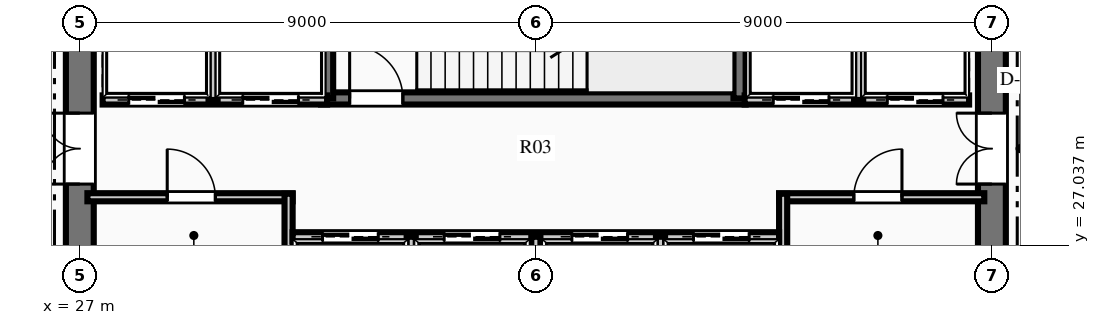
"""IFC4 building model, lengths in metres.
Left out: names, types, materials, properties, quantities, classifications, styles, units other than length and angle.
Written with IfcOpenShell. Run it as: python <this file> out.ifc"""

import sys

from ifc_helpers import new_model, si_unit, direction, frame, frame_2d, origin, place, context, subcontext, project, spatial, rectangle, extrude, element, fill, save


model = new_model("IFC4")
c1 = context("Model", 3, precision=1e-05, world=origin(), true_north=direction((0.0, 1.0)))
c2 = subcontext(c1, "Body", "Model", "MODEL_VIEW")
j1 = project(units=[si_unit("LENGTHUNIT", "METRE"), si_unit("PLANEANGLEUNIT", "RADIAN")], contexts=[c1])
p1 = place(None, origin())
s1 = spatial("IfcSite", under=j1, at=p1, CompositionType="ELEMENT")
p2 = place(p1, origin())
s2 = spatial("IfcBuilding", under=s1, at=p2, CompositionType="ELEMENT")
p3 = place(p2, frame((0.0, 0.0, 81.45)))
s3 = spatial("IfcBuildingStorey", under=s2, at=p3, CompositionType="ELEMENT", Elevation=81.45)
p4 = place(p3, frame((27.0, 18.275, 0.0), z_axis=(0.0, 0.0, 1.0), x_axis=(0.0, 1.0, 0.0)))
e1 = element("IfcWall", 1, at=p4, inside=s3, PredefinedType="SHEAR", context=c2, shape_type="SweptSolid", body=[
    extrude(rectangle(XDim=15.45, YDim=0.55, at=frame_2d((7.725, 0.0))), origin(), (0.0, 0.0, 1.0), 4.5),
])
p5 = place(p4, frame((9.965, 0.0, 0.0)))
e2 = element("IfcOpeningElement", 2, at=p5, cuts=e1, PredefinedType="OPENING", context=c2, shape_type="SweptSolid", body=[
    extrude(rectangle(XDim=1.4, YDim=2.2, at=frame_2d((0.7, 1.1))), frame((0.0, 0.285, 0.0), z_axis=(0.0, -1.0, 0.0), x_axis=(1.0, 0.0, 0.0)), (0.0, 0.0, 1.0), 0.57),
])
p6 = place(p3, frame((45.0, 18.275, 0.0), z_axis=(0.0, 0.0, 1.0), x_axis=(0.0, 1.0, 0.0)))
e3 = element("IfcWall", 3, at=p6, inside=s3, PredefinedType="SHEAR", context=c2, shape_type="SweptSolid", body=[
    extrude(rectangle(XDim=15.45, YDim=0.55, at=frame_2d((7.725, 0.0))), origin(), (0.0, 0.0, 1.0), 4.5),
])
p7 = place(p6, frame((9.965, 0.0, 0.0)))
e4 = element("IfcOpeningElement", 4, at=p7, cuts=e3, PredefinedType="OPENING", context=c2, shape_type="SweptSolid", body=[
    extrude(rectangle(XDim=1.4, YDim=2.2, at=frame_2d((0.7, 1.1))), frame((0.0, 0.285, 0.0), z_axis=(0.0, -1.0, 0.0), x_axis=(1.0, 0.0, 0.0)), (0.0, 0.0, 1.0), 0.57),
])
p8 = place(p3, frame((31.76, 29.93, 0.0), z_axis=(0.0, 0.0, 1.0), x_axis=(1.0, 0.0, 0.0)))
e5 = element("IfcWall", 5, at=p8, inside=s3, PredefinedType="SHEAR", context=c2, shape_type="SweptSolid", body=[
    extrude(rectangle(XDim=8.38, YDim=0.24, at=frame_2d((4.19, 0.0))), origin(), (0.0, 0.0, 1.0), 4.5),
])
p9 = place(p8, frame((0.565, 0.0, 0.0)))
e6 = element("IfcOpeningElement", 6, at=p9, cuts=e5, PredefinedType="OPENING", context=c2, shape_type="SweptSolid", body=[
    extrude(rectangle(XDim=1.05, YDim=2.15, at=frame_2d((0.525, 1.075))), frame((0.0, 0.13, 0.0), z_axis=(0.0, -1.0, 0.0), x_axis=(1.0, 0.0, 0.0)), (0.0, 0.0, 1.0), 0.26),
])
p10 = place(p3, frame((31.88, 29.93, 0.0), z_axis=(0.0, 0.0, 1.0), x_axis=(0.0, 1.0, 0.0)))
e7 = element("IfcWall", 7, at=p10, inside=s3, PredefinedType="SHEAR", context=c2, shape_type="SweptSolid", body=[
    extrude(rectangle(XDim=3.79, YDim=0.24, at=frame_2d((1.895, 0.0))), origin(), (0.0, 0.0, 1.0), 4.5),
])
p11 = place(p3, frame((40.02, 29.93, 0.0), z_axis=(0.0, 0.0, 1.0), x_axis=(0.0, 1.0, 0.0)))
e8 = element("IfcWall", 8, at=p11, inside=s3, PredefinedType="SHEAR", context=c2, shape_type="SweptSolid", body=[
    extrude(rectangle(XDim=3.85, YDim=0.24, at=frame_2d((1.925, 0.0))), origin(), (0.0, 0.0, 1.0), 4.5),
])
p12 = place(p3, frame((27.15, 27.98, 0.0), z_axis=(0.0, 0.0, 1.0), x_axis=(1.0, 0.0, 0.0)))
e9 = element("IfcWall", 9, at=p12, inside=s3, PredefinedType="PARTITIONING", context=c2, shape_type="SweptSolid", body=[
    extrude(rectangle(XDim=4.05, YDim=0.16, at=frame_2d((2.025, 0.0))), origin(), (0.0, 0.0, 1.0), 4.09),
])
p13 = place(p12, frame((1.575, 0.0, 0.0)))
e10 = element("IfcOpeningElement", 10, at=p13, cuts=e9, PredefinedType="OPENING", context=c2, shape_type="SweptSolid", body=[
    extrude(rectangle(XDim=0.95, YDim=2.15, at=frame_2d((0.475, 1.075))), frame((0.0, 0.09, 0.0), z_axis=(0.0, -1.0, 0.0), x_axis=(1.0, 0.0, 0.0)), (0.0, 0.0, 1.0), 0.18),
])
p14 = place(p3, frame((31.12, 26.54, 0.0), z_axis=(0.0, 0.0, 1.0), x_axis=(0.0, 1.0, 0.0)))
e11 = element("IfcWall", 11, at=p14, inside=s3, PredefinedType="PARTITIONING", context=c2, shape_type="SweptSolid", body=[
    extrude(rectangle(XDim=1.51, YDim=0.16, at=frame_2d((0.755, 0.0))), origin(), (0.0, 0.0, 1.0), 4.09),
])
p15 = place(p3, frame((40.8, 27.98, 0.0), z_axis=(0.0, 0.0, 1.0), x_axis=(1.0, 0.0, 0.0)))
e12 = element("IfcWall", 12, at=p15, inside=s3, PredefinedType="PARTITIONING", context=c2, shape_type="SweptSolid", body=[
    extrude(rectangle(XDim=4.05, YDim=0.16, at=frame_2d((2.025, 0.0))), origin(), (0.0, 0.0, 1.0), 4.09),
])
p16 = place(p15, frame((1.475, 0.0, 0.0)))
e13 = element("IfcOpeningElement", 13, at=p16, cuts=e12, PredefinedType="OPENING", context=c2, shape_type="SweptSolid", body=[
    extrude(rectangle(XDim=0.95, YDim=2.15, at=frame_2d((0.475, 1.075))), frame((0.0, 0.09, 0.0), z_axis=(0.0, -1.0, 0.0), x_axis=(1.0, 0.0, 0.0)), (0.0, 0.0, 1.0), 0.18),
])
p17 = place(p3, frame((40.88, 26.54, 0.0), z_axis=(0.0, 0.0, 1.0), x_axis=(0.0, 1.0, 0.0)))
e14 = element("IfcWall", 14, at=p17, inside=s3, PredefinedType="PARTITIONING", context=c2, shape_type="SweptSolid", body=[
    extrude(rectangle(XDim=1.51, YDim=0.16, at=frame_2d((0.755, 0.0))), origin(), (0.0, 0.0, 1.0), 4.09),
])
p18 = place(p3, frame((27.45, 29.9, 0.0), z_axis=(0.0, 0.0, 1.0), x_axis=(1.0, 0.0, 0.0)))
e15 = element("IfcWall", 15, at=p18, inside=s3, PredefinedType="PARTITIONING", context=c2, shape_type="SweptSolid", body=[
    extrude(rectangle(XDim=4.43, YDim=0.18, at=frame_2d((2.215, 0.0))), origin(), (0.0, 0.0, 1.0), 4.09),
])
p19 = place(p18, frame((0.515, 0.0, 0.0)))
e16 = element("IfcOpeningElement", 16, at=p19, cuts=e15, PredefinedType="OPENING", context=c2, shape_type="SweptSolid", body=[
    extrude(rectangle(XDim=1.1, YDim=2.15, at=frame_2d((0.55, 1.075))), frame((0.0, 0.1, 0.0), z_axis=(0.0, -1.0, 0.0), x_axis=(1.0, 0.0, 0.0)), (0.0, 0.0, 1.0), 0.2),
])
p20 = place(p18, frame((2.765, 0.0, 0.0)))
e17 = element("IfcOpeningElement", 17, at=p20, cuts=e15, PredefinedType="OPENING", context=c2, shape_type="SweptSolid", body=[
    extrude(rectangle(XDim=1.1, YDim=2.15, at=frame_2d((0.55, 1.075))), frame((0.0, 0.1, 0.0), z_axis=(0.0, -1.0, 0.0), x_axis=(1.0, 0.0, 0.0)), (0.0, 0.0, 1.0), 0.2),
])
p21 = place(p3, frame((29.63, 29.9, 0.0), z_axis=(0.0, 0.0, 1.0), x_axis=(0.0, 1.0, 0.0)))
e18 = element("IfcWall", 18, at=p21, inside=s3, PredefinedType="PARTITIONING", context=c2, shape_type="SweptSolid", body=[
    extrude(rectangle(XDim=3.75, YDim=0.18, at=frame_2d((1.875, 0.0))), origin(), (0.0, 0.0, 1.0), 4.09),
])
p22 = place(p3, frame((40.12, 29.9, 0.0), z_axis=(0.0, 0.0, 1.0), x_axis=(1.0, 0.0, 0.0)))
e19 = element("IfcWall", 19, at=p22, inside=s3, PredefinedType="PARTITIONING", context=c2, shape_type="SweptSolid", body=[
    extrude(rectangle(XDim=4.43, YDim=0.18, at=frame_2d((2.215, 0.0))), origin(), (0.0, 0.0, 1.0), 4.09),
])
p23 = place(p22, frame((0.565, 0.0, 0.0)))
e20 = element("IfcOpeningElement", 20, at=p23, cuts=e19, PredefinedType="OPENING", context=c2, shape_type="SweptSolid", body=[
    extrude(rectangle(XDim=1.1, YDim=2.15, at=frame_2d((0.55, 1.075))), frame((0.0, 0.1, 0.0), z_axis=(0.0, -1.0, 0.0), x_axis=(1.0, 0.0, 0.0)), (0.0, 0.0, 1.0), 0.2),
])
p24 = place(p22, frame((2.815, 0.0, 0.0)))
e21 = element("IfcOpeningElement", 21, at=p24, cuts=e19, PredefinedType="OPENING", context=c2, shape_type="SweptSolid", body=[
    extrude(rectangle(XDim=1.1, YDim=2.15, at=frame_2d((0.55, 1.075))), frame((0.0, 0.1, 0.0), z_axis=(0.0, -1.0, 0.0), x_axis=(1.0, 0.0, 0.0)), (0.0, 0.0, 1.0), 0.2),
])
p25 = place(p3, frame((42.37, 29.9, 0.0), z_axis=(0.0, 0.0, 1.0), x_axis=(0.0, 1.0, 0.0)))
e22 = element("IfcWall", 22, at=p25, inside=s3, PredefinedType="PARTITIONING", context=c2, shape_type="SweptSolid", body=[
    extrude(rectangle(XDim=3.75, YDim=0.18, at=frame_2d((1.875, 0.0))), origin(), (0.0, 0.0, 1.0), 4.09),
])
p26 = place(p3, frame((31.2, 27.2, 0.0), z_axis=(0.0, 0.0, 1.0), x_axis=(1.0, 0.0, 0.0)))
e23 = element("IfcWall", 23, at=p26, inside=s3, PredefinedType="PARTITIONING", context=c2, shape_type="SweptSolid", body=[
    extrude(rectangle(XDim=9.6, YDim=0.18, at=frame_2d((4.8, 0.0))), origin(), (0.0, 0.0, 1.0), 4.09),
])
p27 = place(p26, frame((0.59, 0.0, 0.0)))
e24 = element("IfcOpeningElement", 24, at=p27, cuts=e23, PredefinedType="OPENING", context=c2, shape_type="SweptSolid", body=[
    extrude(rectangle(XDim=1.1, YDim=2.15, at=frame_2d((0.55, 1.075))), frame((0.0, 0.1, 0.0), z_axis=(0.0, -1.0, 0.0), x_axis=(1.0, 0.0, 0.0)), (0.0, 0.0, 1.0), 0.2),
])
p28 = place(p26, frame((2.99, 0.0, 0.0)))
e25 = element("IfcOpeningElement", 25, at=p28, cuts=e23, PredefinedType="OPENING", context=c2, shape_type="SweptSolid", body=[
    extrude(rectangle(XDim=1.1, YDim=2.15, at=frame_2d((0.55, 1.075))), frame((0.0, 0.1, 0.0), z_axis=(0.0, -1.0, 0.0), x_axis=(1.0, 0.0, 0.0)), (0.0, 0.0, 1.0), 0.2),
])
p29 = place(p26, frame((5.51, 0.0, 0.0)))
e26 = element("IfcOpeningElement", 26, at=p29, cuts=e23, PredefinedType="OPENING", context=c2, shape_type="SweptSolid", body=[
    extrude(rectangle(XDim=1.1, YDim=2.15, at=frame_2d((0.55, 1.075))), frame((0.0, 0.1, 0.0), z_axis=(0.0, -1.0, 0.0), x_axis=(1.0, 0.0, 0.0)), (0.0, 0.0, 1.0), 0.2),
])
p30 = place(p26, frame((7.91, 0.0, 0.0)))
e27 = element("IfcOpeningElement", 27, at=p30, cuts=e23, PredefinedType="OPENING", context=c2, shape_type="SweptSolid", body=[
    extrude(rectangle(XDim=1.1, YDim=2.15, at=frame_2d((0.55, 1.075))), frame((0.0, 0.1, 0.0), z_axis=(0.0, -1.0, 0.0), x_axis=(1.0, 0.0, 0.0)), (0.0, 0.0, 1.0), 0.2),
])
for number, where, z_axis, x_axis in (
    (28, (33.54, 25.3, 0.0), (0.0, 0.0, 1.0), (0.0, 1.0, 0.0)),
    (29, (36.0, 25.3, 0.0), (0.0, 0.0, 1.0), (0.0, 1.0, 0.0)),
    (30, (38.46, 25.3, 0.0), (0.0, 0.0, 1.0), (0.0, 1.0, 0.0)),
):
    element("IfcWall", number, at=place(p3, frame(where, z_axis=z_axis, x_axis=x_axis)), inside=s3, PredefinedType="PARTITIONING", context=c2, shape_type="SweptSolid", body=[
        extrude(rectangle(XDim=1.9, YDim=0.18, at=frame_2d((0.95, 0.0))), origin(), (0.0, 0.0, 1.0), 4.09),
    ])
p31 = place(p13, origin())
e31 = element("IfcDoor", 31, at=p31, inside=s3, OperationType="SINGLE_SWING_LEFT", PredefinedType="DOOR", context=c2, shape_type="SweptSolid", body=[
    extrude(rectangle(XDim=0.95, YDim=2.15, at=frame_2d((0.475, 1.075))), frame((0.0, 0.025, 0.0), z_axis=(0.0, -1.0, 0.0), x_axis=(1.0, 0.0, 0.0)), (0.0, 0.0, 1.0), 0.05),
])
fill(e10, e31)
p32 = place(p16, origin())
e32 = element("IfcDoor", 32, at=p32, inside=s3, OperationType="SINGLE_SWING_RIGHT", PredefinedType="DOOR", context=c2, shape_type="SweptSolid", body=[
    extrude(rectangle(XDim=0.95, YDim=2.15, at=frame_2d((0.475, 1.075))), frame((0.0, 0.025, 0.0), z_axis=(0.0, -1.0, 0.0), x_axis=(1.0, 0.0, 0.0)), (0.0, 0.0, 1.0), 0.05),
])
fill(e13, e32)
p33 = place(p9, origin())
e33 = element("IfcDoor", 33, at=p33, inside=s3, OperationType="SINGLE_SWING_LEFT", PredefinedType="DOOR", context=c2, shape_type="SweptSolid", body=[
    extrude(rectangle(XDim=1.05, YDim=2.15, at=frame_2d((0.525, 1.075))), frame((0.0, 0.025, 0.0), z_axis=(0.0, -1.0, 0.0), x_axis=(1.0, 0.0, 0.0)), (0.0, 0.0, 1.0), 0.05),
])
fill(e6, e33)
p34 = place(p5, origin())
e34 = element("IfcDoor", 34, at=p34, inside=s3, OperationType="DOUBLE_DOOR_SINGLE_SWING", PredefinedType="DOOR", context=c2, shape_type="SweptSolid", body=[
    extrude(rectangle(XDim=1.4, YDim=2.2, at=frame_2d((0.7, 1.1))), frame((0.0, 0.025, 0.0), z_axis=(0.0, -1.0, 0.0), x_axis=(1.0, 0.0, 0.0)), (0.0, 0.0, 1.0), 0.05),
])
fill(e2, e34)
p35 = place(p7, origin())
e35 = element("IfcDoor", 35, at=p35, inside=s3, OperationType="DOUBLE_DOOR_SINGLE_SWING", PredefinedType="DOOR", context=c2, shape_type="SweptSolid", body=[
    extrude(rectangle(XDim=1.4, YDim=2.2, at=frame_2d((0.7, 1.1))), frame((0.0, 0.025, 0.0), z_axis=(0.0, -1.0, 0.0), x_axis=(1.0, 0.0, 0.0)), (0.0, 0.0, 1.0), 0.05),
])
fill(e4, e35)
p36 = place(p19, origin())
e36 = element("IfcDoor", 36, at=p36, inside=s3, OperationType="SLIDING_TO_LEFT", PredefinedType="DOOR", context=c2, shape_type="SweptSolid", body=[
    extrude(rectangle(XDim=1.1, YDim=2.15, at=frame_2d((0.55, 1.075))), frame((0.0, 0.025, 0.0), z_axis=(0.0, -1.0, 0.0), x_axis=(1.0, 0.0, 0.0)), (0.0, 0.0, 1.0), 0.05),
])
fill(e16, e36)
p37 = place(p20, origin())
e37 = element("IfcDoor", 37, at=p37, inside=s3, OperationType="SLIDING_TO_LEFT", PredefinedType="DOOR", context=c2, shape_type="SweptSolid", body=[
    extrude(rectangle(XDim=1.1, YDim=2.15, at=frame_2d((0.55, 1.075))), frame((0.0, 0.025, 0.0), z_axis=(0.0, -1.0, 0.0), x_axis=(1.0, 0.0, 0.0)), (0.0, 0.0, 1.0), 0.05),
])
fill(e17, e37)
p38 = place(p23, origin())
e38 = element("IfcDoor", 38, at=p38, inside=s3, OperationType="SLIDING_TO_LEFT", PredefinedType="DOOR", context=c2, shape_type="SweptSolid", body=[
    extrude(rectangle(XDim=1.1, YDim=2.15, at=frame_2d((0.55, 1.075))), frame((0.0, 0.025, 0.0), z_axis=(0.0, -1.0, 0.0), x_axis=(1.0, 0.0, 0.0)), (0.0, 0.0, 1.0), 0.05),
])
fill(e20, e38)
p39 = place(p24, origin())
e39 = element("IfcDoor", 39, at=p39, inside=s3, OperationType="SLIDING_TO_LEFT", PredefinedType="DOOR", context=c2, shape_type="SweptSolid", body=[
    extrude(rectangle(XDim=1.1, YDim=2.15, at=frame_2d((0.55, 1.075))), frame((0.0, 0.025, 0.0), z_axis=(0.0, -1.0, 0.0), x_axis=(1.0, 0.0, 0.0)), (0.0, 0.0, 1.0), 0.05),
])
fill(e21, e39)
p40 = place(p27, origin())
e40 = element("IfcDoor", 40, at=p40, inside=s3, OperationType="SLIDING_TO_LEFT", PredefinedType="DOOR", context=c2, shape_type="SweptSolid", body=[
    extrude(rectangle(XDim=1.1, YDim=2.15, at=frame_2d((0.55, 1.075))), frame((0.0, 0.025, 0.0), z_axis=(0.0, -1.0, 0.0), x_axis=(1.0, 0.0, 0.0)), (0.0, 0.0, 1.0), 0.05),
])
fill(e24, e40)
p41 = place(p28, origin())
e41 = element("IfcDoor", 41, at=p41, inside=s3, OperationType="SLIDING_TO_LEFT", PredefinedType="DOOR", context=c2, shape_type="SweptSolid", body=[
    extrude(rectangle(XDim=1.1, YDim=2.15, at=frame_2d((0.55, 1.075))), frame((0.0, 0.025, 0.0), z_axis=(0.0, -1.0, 0.0), x_axis=(1.0, 0.0, 0.0)), (0.0, 0.0, 1.0), 0.05),
])
fill(e25, e41)
p42 = place(p29, origin())
e42 = element("IfcDoor", 42, at=p42, inside=s3, OperationType="SLIDING_TO_LEFT", PredefinedType="DOOR", context=c2, shape_type="SweptSolid", body=[
    extrude(rectangle(XDim=1.1, YDim=2.15, at=frame_2d((0.55, 1.075))), frame((0.0, 0.025, 0.0), z_axis=(0.0, -1.0, 0.0), x_axis=(1.0, 0.0, 0.0)), (0.0, 0.0, 1.0), 0.05),
])
fill(e26, e42)
p43 = place(p30, origin())
e43 = element("IfcDoor", 43, at=p43, inside=s3, OperationType="SLIDING_TO_LEFT", PredefinedType="DOOR", context=c2, shape_type="SweptSolid", body=[
    extrude(rectangle(XDim=1.1, YDim=2.15, at=frame_2d((0.55, 1.075))), frame((0.0, 0.025, 0.0), z_axis=(0.0, -1.0, 0.0), x_axis=(1.0, 0.0, 0.0)), (0.0, 0.0, 1.0), 0.05),
])
fill(e27, e43)
save(model, sys.argv[1])
